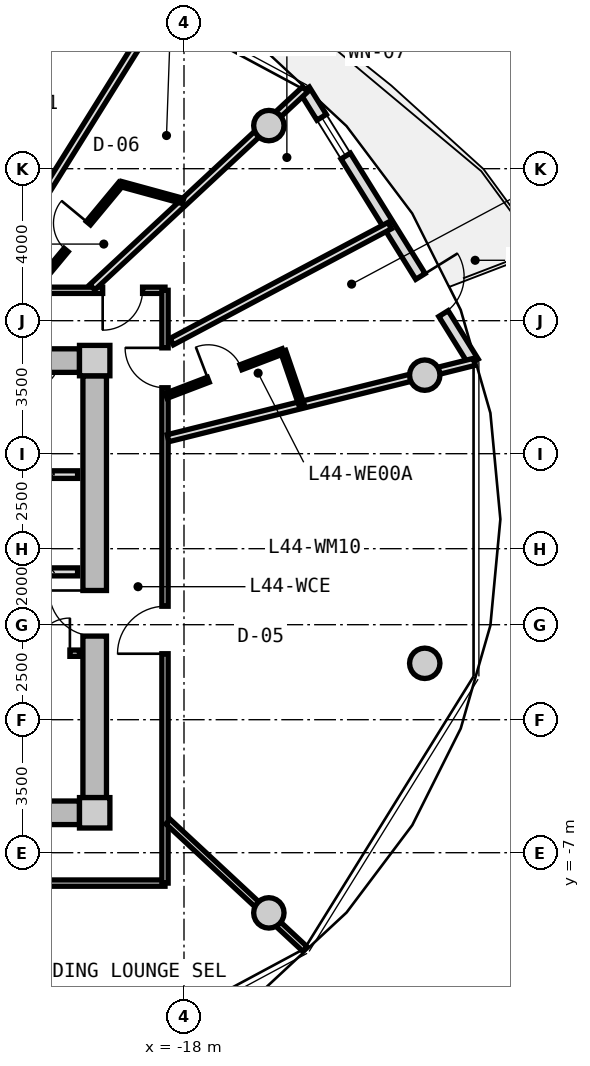
"""IFC4 building model, lengths in metres.
Left out: names, types, materials, properties, quantities, classifications, styles, units other than length and angle.
Written with IfcOpenShell. Run it as: python <this file> out.ifc"""

import sys

from ifc_helpers import new_model, si_unit, direction, frame, frame_2d, origin, origin_2d, place, context, subcontext, project, spatial, rectangle, circle, extrude, source, transform, mapped, element, fill, save


model = new_model("IFC4")
c1 = context("Model", 3, precision=1e-05, world=origin(), true_north=direction((0.0, 1.0)))
c2 = subcontext(c1, "Body", "Model", "MODEL_VIEW")
j1 = project(units=[si_unit("LENGTHUNIT", "METRE"), si_unit("PLANEANGLEUNIT", "RADIAN")], contexts=[c1])
p1 = place(None, origin())
s1 = spatial("IfcSite", under=j1, at=p1, CompositionType="ELEMENT")
p2 = place(p1, origin())
s2 = spatial("IfcBuilding", under=s1, at=p2, CompositionType="ELEMENT")
p3 = place(p2, frame((0.0, 0.0, 143.45)))
s3 = spatial("IfcBuildingStorey", under=s2, at=p3, CompositionType="ELEMENT", Elevation=143.45)
m1 = source(origin(), c2, "Body", "SweptSolid", [
    extrude(rectangle(XDim=0.8, YDim=0.8, at=origin_2d()), origin(), (0.0, 0.0, 1.0), 3.05),
])
for number, where, z_axis, x_axis in (
    (1, (-20.35, -5.95, 0.0), (0.0, 0.0, 1.0), (1.0, 0.0, 0.0)),
    (2, (-20.35, 5.95, 0.0), (0.0, 0.0, 1.0), (1.0, 0.0, 0.0)),
):
    element("IfcColumn", number, at=place(p3, frame(where, z_axis=z_axis, x_axis=x_axis)), inside=s3, PredefinedType="COLUMN", context=c2, shape_type="MappedRepresentation", body=[
        mapped(m1, transform((0.0, 0.0, 0.0), x_axis=(1.0, 0.0, 0.0), y_axis=(0.0, 1.0, 0.0), z_axis=(0.0, 0.0, 1.0), scale=1.0)),
    ])
m2 = source(origin(), c2, "Body", "SweptSolid", [
    extrude(rectangle(XDim=14.5, YDim=0.62, at=frame_2d((7.25, 0.0))), origin(), (0.0, 0.0, 1.0), 2.81),
])
for number, where, z_axis, x_axis in (
    (3, (-35.25, 5.95, 0.0), (0.0, 0.0, 1.0), (1.0, 0.0, 0.0)),
    (4, (-20.75, -5.95, 0.0), (0.0, 0.0, 1.0), (-1.0, 0.0, 0.0)),
):
    element("IfcWall", number, at=place(p3, frame(where, z_axis=z_axis, x_axis=x_axis)), inside=s3, PredefinedType="SHEAR", context=c2, shape_type="MappedRepresentation", body=[
        mapped(m2, transform((0.0, 0.0, 0.0), x_axis=(1.0, 0.0, 0.0), y_axis=(0.0, 1.0, 0.0), z_axis=(0.0, 0.0, 1.0), scale=1.0)),
    ])
m3 = source(origin(), c2, "Body", "SweptSolid", [
    extrude(rectangle(XDim=11.1, YDim=0.62, at=frame_2d((5.55, 0.0))), origin(), (0.0, 0.0, 1.0), 2.81),
])
p4 = place(p3, frame((-20.35, 5.55, 0.0), z_axis=(0.0, 0.0, 1.0), x_axis=(0.0, -1.0, 0.0)))
e5 = element("IfcWall", 5, at=p4, inside=s3, PredefinedType="SHEAR", context=c2, shape_type="MappedRepresentation", body=[
    mapped(m3, transform((0.0, 0.0, 0.0), x_axis=(1.0, 0.0, 0.0), y_axis=(0.0, 1.0, 0.0), z_axis=(0.0, 0.0, 1.0), scale=1.0)),
])
p5 = place(p4, frame((5.65, 0.0, 0.0)))
e6 = element("IfcOpeningElement", 6, at=p5, cuts=e5, PredefinedType="OPENING", context=c2, shape_type="SweptSolid", body=[
    extrude(rectangle(XDim=1.2, YDim=2.15, at=frame_2d((0.6, 1.075))), frame((0.0, 0.32, 0.0), z_axis=(0.0, -1.0, 0.0), x_axis=(1.0, 0.0, 0.0)), (0.0, 0.0, 1.0), 0.64),
])
m4 = source(origin(), c2, "Body", "SweptSolid", [
    extrude(circle(Radius=0.4, at=origin_2d()), origin(), (0.0, 0.0, 1.0), 3.05),
])
for number, where, z_axis, x_axis in (
    (7, (-11.665, 5.567, 0.0), (0.0, 0.0, 1.0), (1.0, 0.0, 0.0)),
    (8, (-15.767, 12.135, 0.0), (0.0, 0.0, 1.0), (1.0, 0.0, 0.0)),
    (9, (-15.767, -8.584, 0.0), (0.0, 0.0, 1.0), (1.0, 0.0, 0.0)),
    (10, (-11.665, -2.016, 0.0), (0.0, 0.0, 1.0), (1.0, 0.0, 0.0)),
):
    element("IfcColumn", number, at=place(p3, frame(where, z_axis=z_axis, x_axis=x_axis)), inside=s3, PredefinedType="COLUMN", context=c2, shape_type="MappedRepresentation", body=[
        mapped(m4, transform((0.0, 0.0, 0.0), x_axis=(1.0, 0.0, 0.0), y_axis=(0.0, 1.0, 0.0), z_axis=(0.0, 0.0, 1.0), scale=1.0)),
    ])
m5 = source(origin(), c2, "Body", "SweptSolid", [
    extrude(rectangle(XDim=8.431, YDim=0.29, at=frame_2d((4.216, 0.0))), origin(), (0.0, 0.0, 1.0), 2.81),
])
p6 = place(p3, frame((-14.827, 13.075, 0.0), z_axis=(0.0, 0.0, 1.0), x_axis=(0.527377998418, -0.849630770855, 0.0)))
e11 = element("IfcWall", 11, at=p6, inside=s3, PredefinedType="SOLIDWALL", context=c2, shape_type="MappedRepresentation", body=[
    mapped(m5, transform((0.0, 0.0, 0.0), x_axis=(1.0, 0.0, 0.0), y_axis=(0.0, 1.0, 0.0), z_axis=(0.0, 0.0, 1.0), scale=1.0)),
])
p7 = place(p6, frame((5.78, 0.0, 0.0)))
e12 = element("IfcOpeningElement", 12, at=p7, cuts=e11, PredefinedType="OPENING", context=c2, shape_type="SweptSolid", body=[
    extrude(rectangle(XDim=1.15, YDim=2.25, at=frame_2d((0.575, 1.125))), frame((0.0, 0.155, 0.0), z_axis=(0.0, -1.0, 0.0), x_axis=(1.0, 0.0, 0.0)), (0.0, 0.0, 1.0), 0.31),
])
p8 = place(p6, frame((0.85, 0.0, 0.85)))
e13 = element("IfcOpeningElement", 13, at=p8, cuts=e11, PredefinedType="OPENING", context=c2, shape_type="SweptSolid", body=[
    extrude(rectangle(XDim=1.2, YDim=1.5, at=frame_2d((0.6, 0.75))), frame((0.0, 0.155, 0.0), z_axis=(0.0, -1.0, 0.0), x_axis=(1.0, 0.0, 0.0)), (0.0, 0.0, 1.0), 0.31),
])
m6 = source(origin(), c2, "Body", "SweptSolid", [
    extrude(rectangle(XDim=3.2, YDim=0.2, at=frame_2d((1.6, 0.0))), origin(), (0.0, 0.0, 1.0), 2.795),
])
p9 = place(p3, frame((-24.0, 2.95, 0.0), z_axis=(0.0, 0.0, 1.0), x_axis=(1.0, 0.0, 0.0)))
e14 = element("IfcWall", 14, at=p9, inside=s3, PredefinedType="PARTITIONING", context=c2, shape_type="MappedRepresentation", body=[
    mapped(m6, transform((0.0, 0.0, 0.0), x_axis=(1.0, 0.0, 0.0), y_axis=(0.0, 1.0, 0.0), z_axis=(0.0, 0.0, 1.0), scale=1.0)),
])
m7 = source(origin(), c2, "Body", "SweptSolid", [
    extrude(rectangle(XDim=6.66, YDim=0.21, at=frame_2d((3.33, 0.0))), origin(), (0.0, 0.0, 1.0), 2.795),
])
p10 = place(p3, frame((-27.46, 0.39, 0.0), z_axis=(0.0, 0.0, 1.0), x_axis=(1.0, 0.0, 0.0)))
e15 = element("IfcWall", 15, at=p10, inside=s3, PredefinedType="PARTITIONING", context=c2, shape_type="MappedRepresentation", body=[
    mapped(m7, transform((0.0, 0.0, 0.0), x_axis=(1.0, 0.0, 0.0), y_axis=(0.0, 1.0, 0.0), z_axis=(0.0, 0.0, 1.0), scale=1.0)),
])
p11 = place(p10, frame((1.0, 0.0, 0.0)))
e16 = element("IfcOpeningElement", 16, at=p11, cuts=e15, PredefinedType="OPENING", context=c2, shape_type="SweptSolid", body=[
    extrude(rectangle(XDim=1.2, YDim=2.15, at=frame_2d((0.6, 1.075))), frame((0.0, 0.115, 0.0), z_axis=(0.0, -1.0, 0.0), x_axis=(1.0, 0.0, 0.0)), (0.0, 0.0, 1.0), 0.23),
])
m8 = source(origin(), c2, "Body", "SweptSolid", [
    extrude(rectangle(XDim=2.7, YDim=0.165, at=frame_2d((1.35, 0.0))), origin(), (0.0, 0.0, 1.0), 2.795),
])
p12 = place(p3, frame((-23.45, -1.75, 0.0), z_axis=(0.0, 0.0, 1.0), x_axis=(1.0, 0.0, 0.0)))
e17 = element("IfcWall", 17, at=p12, inside=s3, PredefinedType="PARTITIONING", context=c2, shape_type="MappedRepresentation", body=[
    mapped(m8, transform((0.0, 0.0, 0.0), x_axis=(1.0, 0.0, 0.0), y_axis=(0.0, 1.0, 0.0), z_axis=(0.0, 0.0, 1.0), scale=1.0)),
])
p13 = place(p12, frame((0.222, 0.0, 0.0)))
e18 = element("IfcOpeningElement", 18, at=p13, cuts=e17, PredefinedType="OPENING", context=c2, shape_type="SweptSolid", body=[
    extrude(rectangle(XDim=0.925, YDim=2.1, at=frame_2d((0.462, 1.05))), frame((0.0, 0.093, 0.0), z_axis=(0.0, -1.0, 0.0), x_axis=(1.0, 0.0, 0.0)), (0.0, 0.0, 1.0), 0.185),
])
p14 = place(p12, frame((1.522, 0.0, 0.0)))
e19 = element("IfcOpeningElement", 19, at=p14, cuts=e17, PredefinedType="OPENING", context=c2, shape_type="SweptSolid", body=[
    extrude(rectangle(XDim=0.925, YDim=2.1, at=frame_2d((0.462, 1.05))), frame((0.0, 0.093, 0.0), z_axis=(0.0, -1.0, 0.0), x_axis=(1.0, 0.0, 0.0)), (0.0, 0.0, 1.0), 0.185),
])
m9 = source(origin(), c2, "Body", "SweptSolid", [
    extrude(rectangle(XDim=8.6, YDim=0.165, at=frame_2d((4.3, 0.0))), origin(), (0.0, 0.0, 1.0), 2.795),
])
p15 = place(p3, frame((-27.1, 7.8, 0.0), z_axis=(0.0, 0.0, 1.0), x_axis=(1.0, 0.0, 0.0)))
e20 = element("IfcWall", 20, at=p15, inside=s3, PredefinedType="PARTITIONING", context=c2, shape_type="MappedRepresentation", body=[
    mapped(m9, transform((0.0, 0.0, 0.0), x_axis=(1.0, 0.0, 0.0), y_axis=(0.0, 1.0, 0.0), z_axis=(0.0, 0.0, 1.0), scale=1.0)),
])
p16 = place(p15, frame((6.96, 0.0, 0.0)))
e21 = element("IfcOpeningElement", 21, at=p16, cuts=e20, PredefinedType="OPENING", context=c2, shape_type="SweptSolid", body=[
    extrude(rectangle(XDim=1.05, YDim=2.15, at=frame_2d((0.525, 1.075))), frame((0.0, 0.093, 0.0), z_axis=(0.0, -1.0, 0.0), x_axis=(1.0, 0.0, 0.0)), (0.0, 0.0, 1.0), 0.185),
])
p17 = place(p15, frame((3.904, 0.0, 0.0)))
e22 = element("IfcOpeningElement", 22, at=p17, cuts=e20, PredefinedType="OPENING", context=c2, shape_type="SweptSolid", body=[
    extrude(rectangle(XDim=1.05, YDim=2.15, at=frame_2d((0.525, 1.075))), frame((0.0, 0.093, 0.0), z_axis=(0.0, -1.0, 0.0), x_axis=(1.0, 0.0, 0.0)), (0.0, 0.0, 1.0), 0.185),
])
p18 = place(p15, frame((2.347, 0.0, 0.0)))
e23 = element("IfcOpeningElement", 23, at=p18, cuts=e20, PredefinedType="OPENING", context=c2, shape_type="SweptSolid", body=[
    extrude(rectangle(XDim=1.05, YDim=2.15, at=frame_2d((0.525, 1.075))), frame((0.0, 0.093, 0.0), z_axis=(0.0, -1.0, 0.0), x_axis=(1.0, 0.0, 0.0)), (0.0, 0.0, 1.0), 0.185),
])
p19 = place(p3, frame((-18.5, -7.8, 0.0), z_axis=(0.0, 0.0, 1.0), x_axis=(-1.0, 0.0, 0.0)))
e24 = element("IfcWall", 24, at=p19, inside=s3, PredefinedType="PARTITIONING", context=c2, shape_type="MappedRepresentation", body=[
    mapped(m9, transform((0.0, 0.0, 0.0), x_axis=(1.0, 0.0, 0.0), y_axis=(0.0, 1.0, 0.0), z_axis=(0.0, 0.0, 1.0), scale=1.0)),
])
p20 = place(p19, frame((3.775, 0.0, 0.0)))
e25 = element("IfcOpeningElement", 25, at=p20, cuts=e24, PredefinedType="OPENING", context=c2, shape_type="SweptSolid", body=[
    extrude(rectangle(XDim=1.05, YDim=2.15, at=frame_2d((0.525, 1.075))), frame((0.0, 0.093, 0.0), z_axis=(0.0, -1.0, 0.0), x_axis=(1.0, 0.0, 0.0)), (0.0, 0.0, 1.0), 0.185),
])
m10 = source(origin(), c2, "Body", "SweptSolid", [
    extrude(rectangle(XDim=15.6, YDim=0.165, at=frame_2d((7.8, 0.0))), origin(), (0.0, 0.0, 1.0), 2.795),
])
p21 = place(p3, frame((-18.5, 7.8, 0.0), z_axis=(0.0, 0.0, 1.0), x_axis=(0.0, -1.0, 0.0)))
e26 = element("IfcWall", 26, at=p21, inside=s3, PredefinedType="PARTITIONING", context=c2, shape_type="MappedRepresentation", body=[
    mapped(m10, transform((0.0, 0.0, 0.0), x_axis=(1.0, 0.0, 0.0), y_axis=(0.0, 1.0, 0.0), z_axis=(0.0, 0.0, 1.0), scale=1.0)),
])
p22 = place(p21, frame((8.314, 0.0, 0.0)))
e27 = element("IfcOpeningElement", 27, at=p22, cuts=e26, PredefinedType="OPENING", context=c2, shape_type="SweptSolid", body=[
    extrude(rectangle(XDim=1.25, YDim=2.2, at=frame_2d((0.625, 1.1))), frame((0.0, 0.093, 0.0), z_axis=(0.0, -1.0, 0.0), x_axis=(1.0, 0.0, 0.0)), (0.0, 0.0, 1.0), 0.185),
])
p23 = place(p21, frame((1.515, 0.0, 0.0)))
e28 = element("IfcOpeningElement", 28, at=p23, cuts=e26, PredefinedType="OPENING", context=c2, shape_type="SweptSolid", body=[
    extrude(rectangle(XDim=1.05, YDim=2.15, at=frame_2d((0.525, 1.075))), frame((0.0, 0.093, 0.0), z_axis=(0.0, -1.0, 0.0), x_axis=(1.0, 0.0, 0.0)), (0.0, 0.0, 1.0), 0.185),
])
m11 = source(origin(), c2, "Body", "SweptSolid", [
    extrude(rectangle(XDim=4.927, YDim=0.165, at=frame_2d((2.463, 0.0))), origin(), (0.0, 0.0, 1.0), 2.345),
])
p24 = place(p3, frame((-18.42, -6.183, 0.0), z_axis=(0.0, 0.0, 1.0), x_axis=(0.732191335987, -0.681098999783, 0.0)))
e29 = element("IfcWall", 29, at=p24, inside=s3, PredefinedType="PARTITIONING", context=c2, shape_type="MappedRepresentation", body=[
    mapped(m11, transform((0.0, 0.0, 0.0), x_axis=(1.0, 0.0, 0.0), y_axis=(0.0, 1.0, 0.0), z_axis=(0.0, 0.0, 1.0), scale=1.0)),
])
m12 = source(origin(), c2, "Body", "SweptSolid", [
    extrude(rectangle(XDim=8.305, YDim=0.19, at=frame_2d((4.153, 0.0))), origin(), (0.0, 0.0, 1.0), 2.345),
])
p25 = place(p3, frame((-18.42, 3.908, 0.0), z_axis=(0.0, 0.0, 1.0), x_axis=(0.970309994378, 0.241864662175, 0.0)))
e30 = element("IfcWall", 30, at=p25, inside=s3, PredefinedType="PARTITIONING", context=c2, shape_type="MappedRepresentation", body=[
    mapped(m12, transform((0.0, 0.0, 0.0), x_axis=(1.0, 0.0, 0.0), y_axis=(0.0, 1.0, 0.0), z_axis=(0.0, 0.0, 1.0), scale=1.0)),
])
m13 = source(origin(), c2, "Body", "SweptSolid", [
    extrude(rectangle(XDim=7.648, YDim=0.19, at=frame_2d((3.824, 0.0))), origin(), (0.0, 0.0, 1.0), 2.345),
])
p26 = place(p3, frame((-20.413, 7.88, 0.0), z_axis=(0.0, 0.0, 1.0), x_axis=(0.732182665826, 0.681108320213, 0.0)))
e31 = element("IfcWall", 31, at=p26, inside=s3, PredefinedType="PARTITIONING", context=c2, shape_type="MappedRepresentation", body=[
    mapped(m13, transform((0.0, 0.0, 0.0), x_axis=(1.0, 0.0, 0.0), y_axis=(0.0, 1.0, 0.0), z_axis=(0.0, 0.0, 1.0), scale=1.0)),
])
m14 = source(origin(), c2, "Body", "SweptSolid", [
    extrude(rectangle(XDim=6.499, YDim=0.19, at=frame_2d((3.25, 0.0))), origin(), (0.0, 0.0, 1.0), 2.795),
])
p27 = place(p3, frame((-18.324, 6.449, 0.0), z_axis=(0.0, 0.0, 1.0), x_axis=(0.882715595921, 0.469907625729, 0.0)))
e32 = element("IfcWall", 32, at=p27, inside=s3, PredefinedType="PARTITIONING", context=c2, shape_type="MappedRepresentation", body=[
    mapped(m14, transform((0.0, 0.0, 0.0), x_axis=(1.0, 0.0, 0.0), y_axis=(0.0, 1.0, 0.0), z_axis=(0.0, 0.0, 1.0), scale=1.0)),
])
m15 = source(origin(), c2, "Body", "SweptSolid", [
    extrude(rectangle(XDim=3.295, YDim=0.14, at=frame_2d((1.647, 0.0))), origin(), (0.0, 0.0, 1.0), 2.795),
])
p28 = place(p3, frame((-18.47, 5.023, 0.0), z_axis=(0.0, 0.0, 1.0), x_axis=(0.934202224769, 0.356743890258, 0.0)))
e33 = element("IfcWall", 33, at=p28, inside=s3, PredefinedType="PARTITIONING", context=c2, shape_type="MappedRepresentation", body=[
    mapped(m15, transform((0.0, 0.0, 0.0), x_axis=(1.0, 0.0, 0.0), y_axis=(0.0, 1.0, 0.0), z_axis=(0.0, 0.0, 1.0), scale=1.0)),
])
p29 = place(p28, frame((1.188, 0.0, 0.0)))
e34 = element("IfcOpeningElement", 34, at=p29, cuts=e33, PredefinedType="OPENING", context=c2, shape_type="SweptSolid", body=[
    extrude(rectangle(XDim=0.92, YDim=2.1, at=frame_2d((0.46, 1.05))), frame((0.0, 0.08, 0.0), z_axis=(0.0, -1.0, 0.0), x_axis=(1.0, 0.0, 0.0)), (0.0, 0.0, 1.0), 0.16),
])
m16 = source(origin(), c2, "Body", "SweptSolid", [
    extrude(rectangle(XDim=1.479, YDim=0.14, at=frame_2d((0.739, 0.0))), origin(), (0.0, 0.0, 1.0), 2.795),
])
p30 = place(p3, frame((-15.392, 6.198, 0.0), z_axis=(0.0, 0.0, 1.0), x_axis=(0.324438293903, -0.945906862989, 0.0)))
e35 = element("IfcWall", 35, at=p30, inside=s3, PredefinedType="PARTITIONING", context=c2, shape_type="MappedRepresentation", body=[
    mapped(m16, transform((0.0, 0.0, 0.0), x_axis=(1.0, 0.0, 0.0), y_axis=(0.0, 1.0, 0.0), z_axis=(0.0, 0.0, 1.0), scale=1.0)),
])
m17 = source(origin(), c2, "Body", "SweptSolid", [
    extrude(rectangle(XDim=8.422, YDim=0.19, at=frame_2d((4.211, 0.0))), origin(), (0.0, 0.0, 1.0), 2.795),
])
p31 = place(p3, frame((-23.125, 8.014, 0.0), z_axis=(0.0, 0.0, 1.0), x_axis=(0.52925352896, 0.848463730565, 0.0)))
e36 = element("IfcWall", 36, at=p31, inside=s3, PredefinedType="PARTITIONING", context=c2, shape_type="MappedRepresentation", body=[
    mapped(m17, transform((0.0, 0.0, 0.0), x_axis=(1.0, 0.0, 0.0), y_axis=(0.0, 1.0, 0.0), z_axis=(0.0, 0.0, 1.0), scale=1.0)),
])
m18 = source(origin(), c2, "Body", "SweptSolid", [
    extrude(rectangle(XDim=3.593, YDim=0.14, at=frame_2d((1.797, 0.0))), origin(), (0.0, 0.0, 1.0), 2.795),
])
p32 = place(p3, frame((-21.955, 7.83, 0.0), z_axis=(0.0, 0.0, 1.0), x_axis=(0.638271060163, 0.769811700196, 0.0)))
e37 = element("IfcWall", 37, at=p32, inside=s3, PredefinedType="PARTITIONING", context=c2, shape_type="MappedRepresentation", body=[
    mapped(m18, transform((0.0, 0.0, 0.0), x_axis=(1.0, 0.0, 0.0), y_axis=(0.0, 1.0, 0.0), z_axis=(0.0, 0.0, 1.0), scale=1.0)),
])
p33 = place(p32, frame((1.337, 0.0, 0.0)))
e38 = element("IfcOpeningElement", 38, at=p33, cuts=e37, PredefinedType="OPENING", context=c2, shape_type="SweptSolid", body=[
    extrude(rectangle(XDim=0.92, YDim=2.1, at=frame_2d((0.46, 1.05))), frame((0.0, 0.08, 0.0), z_axis=(0.0, -1.0, 0.0), x_axis=(1.0, 0.0, 0.0)), (0.0, 0.0, 1.0), 0.16),
])
m19 = source(origin(), c2, "Body", "SweptSolid", [
    extrude(rectangle(XDim=1.697, YDim=0.14, at=frame_2d((0.848, 0.0))), origin(), (0.0, 0.0, 1.0), 2.795),
])
p34 = place(p3, frame((-19.662, 10.596, 0.0), z_axis=(0.0, 0.0, 1.0), x_axis=(0.964667458123, -0.263470482671, 0.0)))
e39 = element("IfcWall", 39, at=p34, inside=s3, PredefinedType="PARTITIONING", context=c2, shape_type="MappedRepresentation", body=[
    mapped(m19, transform((0.0, 0.0, 0.0), x_axis=(1.0, 0.0, 0.0), y_axis=(0.0, 1.0, 0.0), z_axis=(0.0, 0.0, 1.0), scale=1.0)),
])
m20 = source(origin(), c2, "Body", "SweptSolid", [
    extrude(rectangle(XDim=1.15, YDim=2.25, at=frame_2d((0.575, 1.125))), frame((0.0, 0.025, 0.0), z_axis=(0.0, -1.0, 0.0), x_axis=(1.0, 0.0, 0.0)), (0.0, 0.0, 1.0), 0.05),
])
p35 = place(p7, origin())
e40 = element("IfcDoor", 40, at=p35, inside=s3, OperationType="SINGLE_SWING_LEFT", PredefinedType="DOOR", context=c2, shape_type="MappedRepresentation", body=[
    mapped(m20, transform((0.0, 0.0, 0.0), x_axis=(1.0, 0.0, 0.0), y_axis=(0.0, 1.0, 0.0), z_axis=(0.0, 0.0, 1.0), scale=1.0)),
])
fill(e12, e40)
m21 = source(origin(), c2, "Body", "SweptSolid", [
    extrude(rectangle(XDim=1.2, YDim=1.5, at=frame_2d((0.6, 0.75))), frame((0.0, 0.03, 0.0), z_axis=(0.0, -1.0, 0.0), x_axis=(1.0, 0.0, 0.0)), (0.0, 0.0, 1.0), 0.06),
])
p36 = place(p8, origin())
e41 = element("IfcWindow", 41, at=p36, inside=s3, PartitioningType="SINGLE_PANEL", PredefinedType="WINDOW", context=c2, shape_type="MappedRepresentation", body=[
    mapped(m21, transform((0.0, 0.0, 0.0), x_axis=(1.0, 0.0, 0.0), y_axis=(0.0, 1.0, 0.0), z_axis=(0.0, 0.0, 1.0), scale=1.0)),
])
fill(e13, e41)
m22 = source(origin(), c2, "Body", "SweptSolid", [
    extrude(rectangle(XDim=1.2, YDim=2.15, at=frame_2d((0.6, 1.075))), frame((0.0, 0.025, 0.0), z_axis=(0.0, -1.0, 0.0), x_axis=(1.0, 0.0, 0.0)), (0.0, 0.0, 1.0), 0.05),
])
p37 = place(p5, frame((1.2, 0.0, 0.0), z_axis=(0.0, 0.0, 1.0), x_axis=(-1.0, 0.0, 0.0)))
e42 = element("IfcDoor", 42, at=p37, inside=s3, OperationType="SINGLE_SWING_RIGHT", PredefinedType="DOOR", context=c2, shape_type="MappedRepresentation", body=[
    mapped(m22, transform((0.0, 0.0, 0.0), x_axis=(1.0, 0.0, 0.0), y_axis=(0.0, 1.0, 0.0), z_axis=(0.0, 0.0, 1.0), scale=1.0)),
])
fill(e6, e42)
m23 = source(origin(), c2, "Body", "SweptSolid", [
    extrude(rectangle(XDim=0.925, YDim=2.1, at=frame_2d((0.462, 1.05))), frame((0.0, 0.025, 0.0), z_axis=(0.0, -1.0, 0.0), x_axis=(1.0, 0.0, 0.0)), (0.0, 0.0, 1.0), 0.05),
])
p38 = place(p14, origin())
e43 = element("IfcDoor", 43, at=p38, inside=s3, OperationType="SINGLE_SWING_RIGHT", PredefinedType="DOOR", context=c2, shape_type="MappedRepresentation", body=[
    mapped(m23, transform((0.0, 0.0, 0.0), x_axis=(1.0, 0.0, 0.0), y_axis=(0.0, 1.0, 0.0), z_axis=(0.0, 0.0, 1.0), scale=1.0)),
])
fill(e19, e43)
m24 = source(origin(), c2, "Body", "SweptSolid", [
    extrude(rectangle(XDim=1.25, YDim=2.2, at=frame_2d((0.625, 1.1))), frame((0.0, 0.025, 0.0), z_axis=(0.0, -1.0, 0.0), x_axis=(1.0, 0.0, 0.0)), (0.0, 0.0, 1.0), 0.05),
])
p39 = place(p22, frame((1.25, 0.0, 0.0), z_axis=(0.0, 0.0, 1.0), x_axis=(-1.0, 0.0, 0.0)))
e44 = element("IfcDoor", 44, at=p39, inside=s3, OperationType="SINGLE_SWING_LEFT", PredefinedType="DOOR", context=c2, shape_type="MappedRepresentation", body=[
    mapped(m24, transform((0.0, 0.0, 0.0), x_axis=(1.0, 0.0, 0.0), y_axis=(0.0, 1.0, 0.0), z_axis=(0.0, 0.0, 1.0), scale=1.0)),
])
fill(e27, e44)
m25 = source(origin(), c2, "Body", "SweptSolid", [
    extrude(rectangle(XDim=1.05, YDim=2.15, at=frame_2d((0.525, 1.075))), frame((0.0, 0.025, 0.0), z_axis=(0.0, -1.0, 0.0), x_axis=(1.0, 0.0, 0.0)), (0.0, 0.0, 1.0), 0.05),
])
p40 = place(p23, frame((1.05, 0.0, 0.0), z_axis=(0.0, 0.0, 1.0), x_axis=(-1.0, 0.0, 0.0)))
e45 = element("IfcDoor", 45, at=p40, inside=s3, OperationType="SINGLE_SWING_RIGHT", PredefinedType="DOOR", context=c2, shape_type="MappedRepresentation", body=[
    mapped(m25, transform((0.0, 0.0, 0.0), x_axis=(1.0, 0.0, 0.0), y_axis=(0.0, 1.0, 0.0), z_axis=(0.0, 0.0, 1.0), scale=1.0)),
])
fill(e28, e45)
m26 = source(origin(), c2, "Body", "SweptSolid", [
    extrude(rectangle(XDim=0.92, YDim=2.1, at=frame_2d((0.46, 1.05))), frame((0.0, 0.025, 0.0), z_axis=(0.0, -1.0, 0.0), x_axis=(1.0, 0.0, 0.0)), (0.0, 0.0, 1.0), 0.05),
])
p41 = place(p29, origin())
e46 = element("IfcDoor", 46, at=p41, inside=s3, OperationType="SINGLE_SWING_LEFT", PredefinedType="DOOR", context=c2, shape_type="MappedRepresentation", body=[
    mapped(m26, transform((0.0, 0.0, 0.0), x_axis=(1.0, 0.0, 0.0), y_axis=(0.0, 1.0, 0.0), z_axis=(0.0, 0.0, 1.0), scale=1.0)),
])
fill(e34, e46)
p42 = place(p16, frame((1.05, 0.0, 0.0), z_axis=(0.0, 0.0, 1.0), x_axis=(-1.0, 0.0, 0.0)))
e47 = element("IfcDoor", 47, at=p42, inside=s3, OperationType="SINGLE_SWING_RIGHT", PredefinedType="DOOR", context=c2, shape_type="MappedRepresentation", body=[
    mapped(m25, transform((0.0, 0.0, 0.0), x_axis=(1.0, 0.0, 0.0), y_axis=(0.0, 1.0, 0.0), z_axis=(0.0, 0.0, 1.0), scale=1.0)),
])
fill(e21, e47)
p43 = place(p33, origin())
e48 = element("IfcDoor", 48, at=p43, inside=s3, OperationType="SINGLE_SWING_RIGHT", PredefinedType="DOOR", context=c2, shape_type="MappedRepresentation", body=[
    mapped(m26, transform((0.0, 0.0, 0.0), x_axis=(1.0, 0.0, 0.0), y_axis=(0.0, 1.0, 0.0), z_axis=(0.0, 0.0, 1.0), scale=1.0)),
])
fill(e38, e48)
save(model, sys.argv[1])
